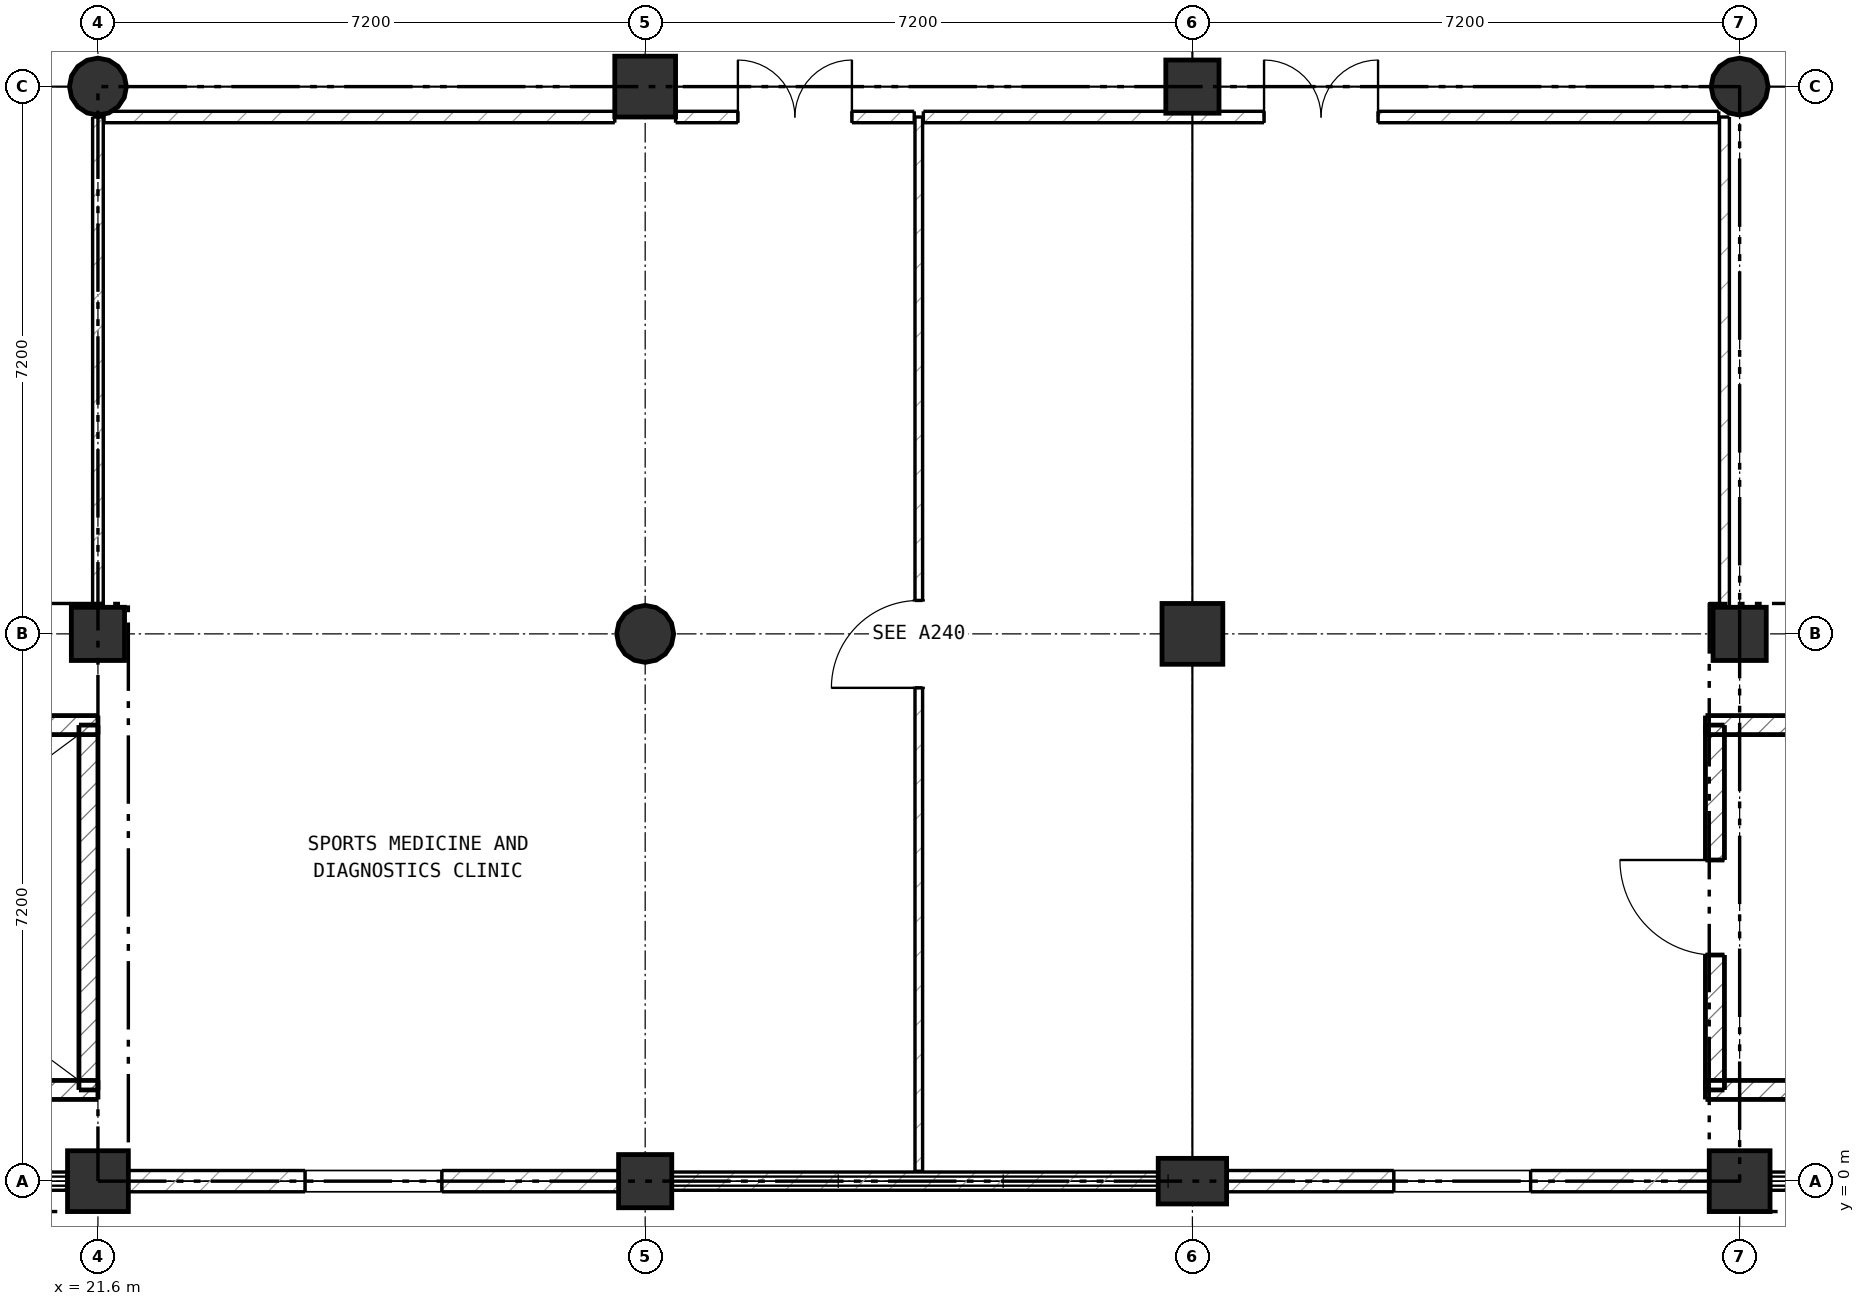
"""IFC4 building model, lengths in metres.
Left out: names, types, materials, properties, quantities, classifications, styles, units other than length and angle.
Written with IfcOpenShell. Run it as: python <this file> out.ifc"""

import sys

from ifc_helpers import new_model, si_unit, direction, frame, frame_2d, origin, origin_2d, place, context, subcontext, project, spatial, rectangle, circle, extrude, element, fill, save


model = new_model("IFC4")
c1 = context("Model", 3, precision=1e-05, world=origin(), true_north=direction((0.0, 1.0)))
c2 = subcontext(c1, "Body", "Model", "MODEL_VIEW")
j1 = project(units=[si_unit("LENGTHUNIT", "METRE"), si_unit("PLANEANGLEUNIT", "RADIAN")], contexts=[c1])
p1 = place(None, origin())
s1 = spatial("IfcSite", under=j1, at=p1, CompositionType="ELEMENT")
p2 = place(p1, origin())
s2 = spatial("IfcBuilding", under=s1, at=p2, CompositionType="ELEMENT")
p3 = place(p2, frame((0.0, 0.0, 5.6)))
s3 = spatial("IfcBuildingStorey", under=s2, at=p3, CompositionType="ELEMENT", Elevation=5.6)
p4 = place(p3, frame((21.6, 0.0, 0.0), z_axis=(0.0, 0.0, 1.0), x_axis=(1.0, 0.0, 0.0)))
e1 = element("IfcColumn", 1, at=p4, inside=s3, PredefinedType="COLUMN", context=c2, shape_type="SweptSolid", body=[
    extrude(rectangle(XDim=0.8, YDim=0.8, at=origin_2d()), origin(), (0.0, 0.0, 1.0), 5.6),
])
p5 = place(p3, frame((21.6, 7.2, 0.0), z_axis=(0.0, 0.0, 1.0), x_axis=(1.0, 0.0, 0.0)))
e2 = element("IfcColumn", 2, at=p5, inside=s3, PredefinedType="COLUMN", context=c2, shape_type="SweptSolid", body=[
    extrude(rectangle(XDim=0.7, YDim=0.7, at=origin_2d()), origin(), (0.0, 0.0, 1.0), 5.6),
])
p6 = place(p3, frame((21.6, 14.4, 0.0), z_axis=(0.0, 0.0, 1.0), x_axis=(1.0, 0.0, 0.0)))
e3 = element("IfcColumn", 3, at=p6, inside=s3, PredefinedType="COLUMN", context=c2, shape_type="SweptSolid", body=[
    extrude(circle(Radius=0.375, at=origin_2d()), origin(), (0.0, 0.0, 1.0), 5.6),
])
p7 = place(p3, frame((28.8, 0.0, 0.0), z_axis=(0.0, 0.0, 1.0), x_axis=(1.0, 0.0, 0.0)))
e4 = element("IfcColumn", 4, at=p7, inside=s3, PredefinedType="COLUMN", context=c2, shape_type="SweptSolid", body=[
    extrude(rectangle(XDim=0.7, YDim=0.7, at=origin_2d()), origin(), (0.0, 0.0, 1.0), 5.6),
])
p8 = place(p3, frame((28.8, 7.2, 0.0), z_axis=(0.0, 0.0, 1.0), x_axis=(1.0, 0.0, 0.0)))
e5 = element("IfcColumn", 5, at=p8, inside=s3, PredefinedType="COLUMN", context=c2, shape_type="SweptSolid", body=[
    extrude(circle(Radius=0.375, at=origin_2d()), origin(), (0.0, 0.0, 1.0), 5.6),
])
p9 = place(p3, frame((28.8, 14.4, 0.0), z_axis=(0.0, 0.0, 1.0), x_axis=(1.0, 0.0, 0.0)))
e6 = element("IfcColumn", 6, at=p9, inside=s3, PredefinedType="COLUMN", context=c2, shape_type="SweptSolid", body=[
    extrude(rectangle(XDim=0.8, YDim=0.8, at=origin_2d()), origin(), (0.0, 0.0, 1.0), 5.6),
])
p10 = place(p3, frame((36.0, 0.0, 0.0), z_axis=(0.0, 0.0, 1.0), x_axis=(1.0, 0.0, 0.0)))
e7 = element("IfcColumn", 7, at=p10, inside=s3, PredefinedType="COLUMN", context=c2, shape_type="SweptSolid", body=[
    extrude(rectangle(XDim=0.6, YDim=0.9, at=origin_2d()), origin(), (0.0, 0.0, 1.0), 5.6),
])
p11 = place(p3, frame((36.0, 7.2, 0.0), z_axis=(0.0, 0.0, 1.0), x_axis=(1.0, 0.0, 0.0)))
e8 = element("IfcColumn", 8, at=p11, inside=s3, PredefinedType="COLUMN", context=c2, shape_type="SweptSolid", body=[
    extrude(rectangle(XDim=0.8, YDim=0.8, at=origin_2d()), origin(), (0.0, 0.0, 1.0), 5.6),
])
p12 = place(p3, frame((36.0, 14.4, 0.0), z_axis=(0.0, 0.0, 1.0), x_axis=(1.0, 0.0, 0.0)))
e9 = element("IfcColumn", 9, at=p12, inside=s3, PredefinedType="COLUMN", context=c2, shape_type="SweptSolid", body=[
    extrude(rectangle(XDim=0.7, YDim=0.7, at=origin_2d()), origin(), (0.0, 0.0, 1.0), 5.6),
])
p13 = place(p3, frame((43.2, 0.0, 0.0), z_axis=(0.0, 0.0, 1.0), x_axis=(1.0, 0.0, 0.0)))
e10 = element("IfcColumn", 10, at=p13, inside=s3, PredefinedType="COLUMN", context=c2, shape_type="SweptSolid", body=[
    extrude(rectangle(XDim=0.8, YDim=0.8, at=origin_2d()), origin(), (0.0, 0.0, 1.0), 5.6),
])
p14 = place(p3, frame((43.2, 7.2, 0.0), z_axis=(0.0, 0.0, 1.0), x_axis=(1.0, 0.0, 0.0)))
e11 = element("IfcColumn", 11, at=p14, inside=s3, PredefinedType="COLUMN", context=c2, shape_type="SweptSolid", body=[
    extrude(rectangle(XDim=0.7, YDim=0.7, at=origin_2d()), origin(), (0.0, 0.0, 1.0), 5.6),
])
p15 = place(p3, frame((43.2, 14.4, 0.0), z_axis=(0.0, 0.0, 1.0), x_axis=(1.0, 0.0, 0.0)))
e12 = element("IfcColumn", 12, at=p15, inside=s3, PredefinedType="COLUMN", context=c2, shape_type="SweptSolid", body=[
    extrude(circle(Radius=0.375, at=origin_2d()), origin(), (0.0, 0.0, 1.0), 5.6),
])
p16 = place(p3, frame((50.065, 0.0, 0.0), z_axis=(0.0, 0.0, 1.0), x_axis=(-1.0, 0.0, 0.0)))
e13 = element("IfcWall", 13, at=p16, inside=s3, PredefinedType="SOLIDWALL", context=c2, shape_type="SweptSolid", body=[
    extrude(rectangle(XDim=6.48, YDim=0.24, at=frame_2d((3.24, 0.0))), origin(), (0.0, 0.0, 1.0), 0.35),
])
p17 = place(p3, frame((42.815, 0.0, 0.0), z_axis=(0.0, 0.0, 1.0), x_axis=(-1.0, 0.0, 0.0)))
e14 = element("IfcWall", 14, at=p17, inside=s3, PredefinedType="SOLIDWALL", context=c2, shape_type="SweptSolid", body=[
    extrude(rectangle(XDim=6.53, YDim=0.28, at=frame_2d((3.265, 0.0))), origin(), (0.0, 0.0, 1.0), 4.985),
])
p18 = place(p17, frame((2.365, 0.0, 1.0)))
e15 = element("IfcOpeningElement", 15, at=p18, cuts=e14, PredefinedType="OPENING", context=c2, shape_type="SweptSolid", body=[
    extrude(rectangle(XDim=1.8, YDim=1.8, at=frame_2d((0.9, 0.9))), frame((0.0, 0.15, 0.0), z_axis=(0.0, -1.0, 0.0), x_axis=(1.0, 0.0, 0.0)), (0.0, 0.0, 1.0), 0.3),
])
p19 = place(p3, frame((35.715, 0.0, 0.0), z_axis=(0.0, 0.0, 1.0), x_axis=(-1.0, 0.0, 0.0)))
e16 = element("IfcWall", 16, at=p19, inside=s3, PredefinedType="SOLIDWALL", context=c2, shape_type="SweptSolid", body=[
    extrude(rectangle(XDim=6.58, YDim=0.24, at=frame_2d((3.29, 0.0))), origin(), (0.0, 0.0, 1.0), 0.35),
])
p20 = place(p3, frame((28.465, 0.0, 0.0), z_axis=(0.0, 0.0, 1.0), x_axis=(-1.0, 0.0, 0.0)))
e17 = element("IfcWall", 17, at=p20, inside=s3, PredefinedType="SOLIDWALL", context=c2, shape_type="SweptSolid", body=[
    extrude(rectangle(XDim=6.48, YDim=0.28, at=frame_2d((3.24, 0.0))), origin(), (0.0, 0.0, 1.0), 4.985),
])
p21 = place(p20, frame((2.34, 0.0, 1.0)))
e18 = element("IfcOpeningElement", 18, at=p21, cuts=e17, PredefinedType="OPENING", context=c2, shape_type="SweptSolid", body=[
    extrude(rectangle(XDim=1.8, YDim=1.8, at=frame_2d((0.9, 0.9))), frame((0.0, 0.15, 0.0), z_axis=(0.0, -1.0, 0.0), x_axis=(1.0, 0.0, 0.0)), (0.0, 0.0, 1.0), 0.3),
])
p22 = place(p3, frame((21.215, 0.0, 0.0), z_axis=(0.0, 0.0, 1.0), x_axis=(-1.0, 0.0, 0.0)))
e19 = element("IfcWall", 19, at=p22, inside=s3, PredefinedType="SOLIDWALL", context=c2, shape_type="SweptSolid", body=[
    extrude(rectangle(XDim=6.53, YDim=0.24, at=frame_2d((3.265, 0.0))), origin(), (0.0, 0.0, 1.0), 0.35),
])
p23 = place(p3, frame((13.95, 6.0, 0.0), z_axis=(0.0, 0.0, 1.0), x_axis=(1.0, 0.0, 0.0)))
e20 = element("IfcWall", 20, at=p23, inside=s3, PredefinedType="SHEAR", context=c2, shape_type="SweptSolid", body=[
    extrude(rectangle(XDim=7.65, YDim=0.25, at=frame_2d((3.825, 0.0))), origin(), (0.0, 0.0, 1.0), 5.6),
])
p24 = place(p3, frame((21.475, 6.0, 0.0), z_axis=(0.0, 0.0, 1.0), x_axis=(0.0, -1.0, 0.0)))
e21 = element("IfcWall", 21, at=p24, inside=s3, PredefinedType="SHEAR", context=c2, shape_type="SweptSolid", body=[
    extrude(rectangle(XDim=4.8, YDim=0.25, at=frame_2d((2.4, 0.0))), origin(), (0.0, 0.0, 1.0), 5.6),
])
p25 = place(p3, frame((21.6, 1.2, 0.0), z_axis=(0.0, 0.0, 1.0), x_axis=(-1.0, 0.0, 0.0)))
e22 = element("IfcWall", 22, at=p25, inside=s3, PredefinedType="SHEAR", context=c2, shape_type="SweptSolid", body=[
    extrude(rectangle(XDim=7.65, YDim=0.25, at=frame_2d((3.825, 0.0))), origin(), (0.0, 0.0, 1.0), 5.6),
])
p26 = place(p3, frame((42.875, 1.2, 0.0), z_axis=(0.0, 0.0, 1.0), x_axis=(0.0, 1.0, 0.0)))
e23 = element("IfcWall", 23, at=p26, inside=s3, PredefinedType="SHEAR", context=c2, shape_type="SweptSolid", body=[
    extrude(rectangle(XDim=4.8, YDim=0.25, at=frame_2d((2.4, 0.0))), origin(), (0.0, 0.0, 1.0), 5.6),
])
p27 = place(p26, frame((1.775, 0.0, 0.0)))
e24 = element("IfcOpeningElement", 24, at=p27, cuts=e23, PredefinedType="OPENING", context=c2, shape_type="SweptSolid", body=[
    extrude(rectangle(XDim=1.25, YDim=2.2, at=frame_2d((0.625, 1.1))), frame((0.0, 0.135, 0.0), z_axis=(0.0, -1.0, 0.0), x_axis=(1.0, 0.0, 0.0)), (0.0, 0.0, 1.0), 0.27),
])
for number, where, z_axis, x_axis in (
    (25, (42.75, 6.0, 0.0), (0.0, 0.0, 1.0), (1.0, 0.0, 0.0)),
    (26, (50.4, 1.2, 0.0), (0.0, 0.0, 1.0), (-1.0, 0.0, 0.0)),
):
    element("IfcWall", number, at=place(p3, frame(where, z_axis=z_axis, x_axis=x_axis)), inside=s3, PredefinedType="SHEAR", context=c2, shape_type="SweptSolid", body=[
        extrude(rectangle(XDim=7.65, YDim=0.25, at=frame_2d((3.825, 0.0))), origin(), (0.0, 0.0, 1.0), 5.6),
    ])
p28 = place(p3, frame((21.6, 7.55, 0.0), z_axis=(0.0, 0.0, 1.0), x_axis=(0.0, 1.0, 0.0)))
e27 = element("IfcWall", 27, at=p28, inside=s3, PredefinedType="PARTITIONING", context=c2, shape_type="SweptSolid", body=[
    extrude(rectangle(XDim=6.45, YDim=0.14, at=frame_2d((3.225, 0.0))), origin(), (0.0, 0.0, 1.0), 5.31),
])
p29 = place(p3, frame((43.0, 7.55, 0.0), z_axis=(0.0, 0.0, 1.0), x_axis=(0.0, 1.0, 0.0)))
e28 = element("IfcWall", 28, at=p29, inside=s3, PredefinedType="PARTITIONING", context=c2, shape_type="SweptSolid", body=[
    extrude(rectangle(XDim=6.45, YDim=0.13, at=frame_2d((3.225, 0.0))), origin(), (0.0, 0.0, 1.0), 4.88),
])
p30 = place(p3, frame((32.4, 0.13, 0.0), z_axis=(0.0, 0.0, 1.0), x_axis=(0.0, 1.0, 0.0)))
e29 = element("IfcWall", 29, at=p30, inside=s3, PredefinedType="PARTITIONING", context=c2, shape_type="SweptSolid", body=[
    extrude(rectangle(XDim=13.87, YDim=0.1, at=frame_2d((6.935, 0.0))), origin(), (0.0, 0.0, 1.0), 5.31),
])
p31 = place(p30, frame((6.36, 0.0, 0.0)))
e30 = element("IfcOpeningElement", 30, at=p31, cuts=e29, PredefinedType="OPENING", context=c2, shape_type="SweptSolid", body=[
    extrude(rectangle(XDim=1.15, YDim=2.15, at=frame_2d((0.575, 1.075))), frame((0.0, 0.06, 0.0), z_axis=(0.0, -1.0, 0.0), x_axis=(1.0, 0.0, 0.0)), (0.0, 0.0, 1.0), 0.12),
])
p32 = place(p3, frame((21.68, 14.0, 0.0), z_axis=(0.0, 0.0, 1.0), x_axis=(1.0, 0.0, 0.0)))
e31 = element("IfcWall", 31, at=p32, inside=s3, PredefinedType="PARTITIONING", context=c2, shape_type="SweptSolid", body=[
    extrude(rectangle(XDim=6.72, YDim=0.15, at=frame_2d((3.36, 0.0))), origin(), (0.0, 0.0, 1.0), 5.31),
])
p33 = place(p3, frame((29.2, 14.0, 0.0), z_axis=(0.0, 0.0, 1.0), x_axis=(1.0, 0.0, 0.0)))
e32 = element("IfcWall", 32, at=p33, inside=s3, PredefinedType="PARTITIONING", context=c2, shape_type="SweptSolid", body=[
    extrude(rectangle(XDim=3.14, YDim=0.15, at=frame_2d((1.57, 0.0))), origin(), (0.0, 0.0, 1.0), 5.31),
])
p34 = place(p33, frame((0.82, 0.0, 0.0)))
e33 = element("IfcOpeningElement", 33, at=p34, cuts=e32, PredefinedType="OPENING", context=c2, shape_type="SweptSolid", body=[
    extrude(rectangle(XDim=1.5, YDim=2.2, at=frame_2d((0.75, 1.1))), frame((0.0, 0.085, 0.0), z_axis=(0.0, -1.0, 0.0), x_axis=(1.0, 0.0, 0.0)), (0.0, 0.0, 1.0), 0.17),
])
p35 = place(p3, frame((32.46, 14.0, 0.0), z_axis=(0.0, 0.0, 1.0), x_axis=(1.0, 0.0, 0.0)))
e34 = element("IfcWall", 34, at=p35, inside=s3, PredefinedType="PARTITIONING", context=c2, shape_type="SweptSolid", body=[
    extrude(rectangle(XDim=10.465, YDim=0.15, at=frame_2d((5.232, 0.0))), origin(), (0.0, 0.0, 1.0), 5.31),
])
p36 = place(p35, frame((4.482, 0.0, 0.0)))
e35 = element("IfcOpeningElement", 35, at=p36, cuts=e34, PredefinedType="OPENING", context=c2, shape_type="SweptSolid", body=[
    extrude(rectangle(XDim=1.5, YDim=2.2, at=frame_2d((0.75, 1.1))), frame((0.0, 0.085, 0.0), z_axis=(0.0, -1.0, 0.0), x_axis=(1.0, 0.0, 0.0)), (0.0, 0.0, 1.0), 0.17),
])
p37 = place(p18, origin())
e36 = element("IfcWindow", 36, at=p37, inside=s3, PartitioningType="SINGLE_PANEL", PredefinedType="WINDOW", context=c2, shape_type="SweptSolid", body=[
    extrude(rectangle(XDim=1.8, YDim=1.8, at=frame_2d((0.9, 0.9))), frame((0.0, 0.03, 0.0), z_axis=(0.0, -1.0, 0.0), x_axis=(1.0, 0.0, 0.0)), (0.0, 0.0, 1.0), 0.06),
])
fill(e15, e36)
p38 = place(p21, origin())
e37 = element("IfcWindow", 37, at=p38, inside=s3, PartitioningType="SINGLE_PANEL", PredefinedType="WINDOW", context=c2, shape_type="SweptSolid", body=[
    extrude(rectangle(XDim=1.8, YDim=1.8, at=frame_2d((0.9, 0.9))), frame((0.0, 0.03, 0.0), z_axis=(0.0, -1.0, 0.0), x_axis=(1.0, 0.0, 0.0)), (0.0, 0.0, 1.0), 0.06),
])
fill(e18, e37)
p39 = place(p27, origin())
e38 = element("IfcDoor", 38, at=p39, inside=s3, OperationType="SINGLE_SWING_RIGHT", PredefinedType="DOOR", context=c2, shape_type="SweptSolid", body=[
    extrude(rectangle(XDim=1.25, YDim=2.2, at=frame_2d((0.625, 1.1))), frame((0.0, 0.025, 0.0), z_axis=(0.0, -1.0, 0.0), x_axis=(1.0, 0.0, 0.0)), (0.0, 0.0, 1.0), 0.05),
])
fill(e24, e38)
p40 = place(p31, origin())
e39 = element("IfcDoor", 39, at=p40, inside=s3, OperationType="SINGLE_SWING_LEFT", PredefinedType="DOOR", context=c2, shape_type="SweptSolid", body=[
    extrude(rectangle(XDim=1.15, YDim=2.15, at=frame_2d((0.575, 1.075))), frame((0.0, 0.025, 0.0), z_axis=(0.0, -1.0, 0.0), x_axis=(1.0, 0.0, 0.0)), (0.0, 0.0, 1.0), 0.05),
])
fill(e30, e39)
p41 = place(p34, origin())
e40 = element("IfcDoor", 40, at=p41, inside=s3, OperationType="DOUBLE_DOOR_SINGLE_SWING", PredefinedType="DOOR", context=c2, shape_type="SweptSolid", body=[
    extrude(rectangle(XDim=1.5, YDim=2.2, at=frame_2d((0.75, 1.1))), frame((0.0, 0.025, 0.0), z_axis=(0.0, -1.0, 0.0), x_axis=(1.0, 0.0, 0.0)), (0.0, 0.0, 1.0), 0.05),
])
fill(e33, e40)
p42 = place(p36, origin())
e41 = element("IfcDoor", 41, at=p42, inside=s3, OperationType="DOUBLE_DOOR_SINGLE_SWING", PredefinedType="DOOR", context=c2, shape_type="SweptSolid", body=[
    extrude(rectangle(XDim=1.5, YDim=2.2, at=frame_2d((0.75, 1.1))), frame((0.0, 0.025, 0.0), z_axis=(0.0, -1.0, 0.0), x_axis=(1.0, 0.0, 0.0)), (0.0, 0.0, 1.0), 0.05),
])
fill(e35, e41)
save(model, sys.argv[1])
